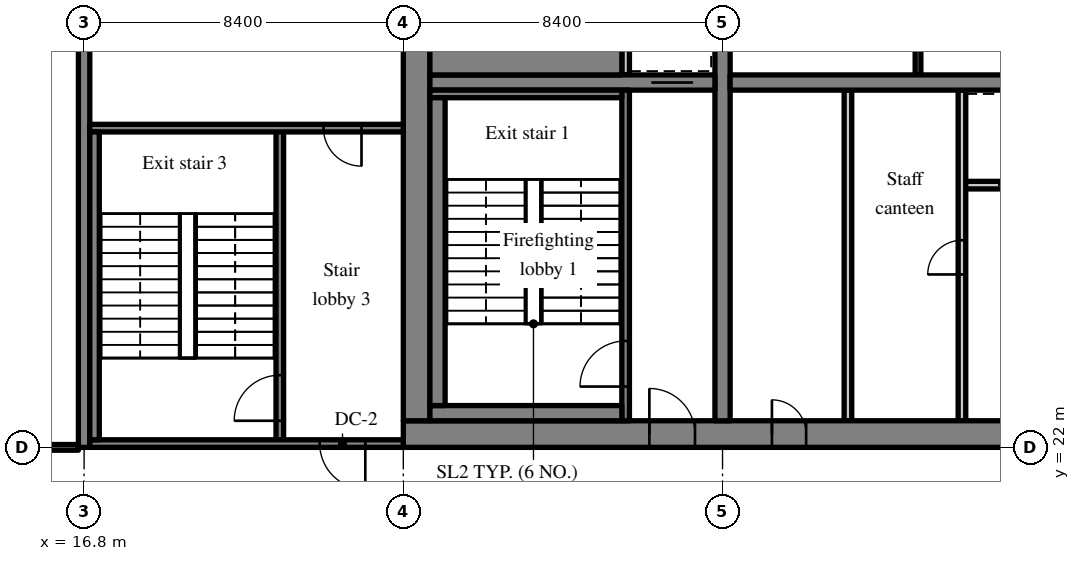
"""IFC4 building model, lengths in metres.
Left out: names, types, materials, properties, quantities, classifications, styles, units other than length and angle.
Written with IfcOpenShell. Run it as: python <this file> out.ifc"""

import sys

from ifc_helpers import new_model, si_unit, direction, frame, frame_2d, origin, place, context, subcontext, project, spatial, rectangle, extrude, source, transform, mapped, element, fill, save


model = new_model("IFC4")
c1 = context("Model", 3, precision=1e-05, world=origin(), true_north=direction((0.0, 1.0)))
c2 = subcontext(c1, "Body", "Model", "MODEL_VIEW")
j1 = project(units=[si_unit("LENGTHUNIT", "METRE"), si_unit("PLANEANGLEUNIT", "RADIAN")], contexts=[c1])
p1 = place(None, origin())
s1 = spatial("IfcSite", under=j1, at=p1, CompositionType="ELEMENT")
p2 = place(p1, origin())
s2 = spatial("IfcBuilding", under=s1, at=p2, CompositionType="ELEMENT")
p3 = place(p2, frame((0.0, 0.0, 163.0)))
s3 = spatial("IfcBuildingStorey", under=s2, at=p3, CompositionType="ELEMENT", Elevation=163.0)
m1 = source(origin(), c2, "Body", "SweptSolid", [
    extrude(rectangle(XDim=50.4, YDim=0.7, at=frame_2d((25.2, 0.0))), origin(), (0.0, 0.0, 1.0), 3.52),
])
p4 = place(p3, frame((25.2, 22.35, 0.0), z_axis=(0.0, 0.0, 1.0), x_axis=(1.0, 0.0, 0.0)))
e1 = element("IfcWall", 1, at=p4, inside=s3, PredefinedType="SHEAR", context=c2, shape_type="MappedRepresentation", body=[
    mapped(m1, transform((0.0, 0.0, 0.0), scale=1.0)),
])
m2 = source(origin(), c2, "Body", "SweptSolid", [
    extrude(rectangle(XDim=1.8, YDim=2.1, at=frame_2d((0.9, 1.05))), frame((0.0, 0.36, 0.0), z_axis=(0.0, -1.0, 0.0), x_axis=(1.0, 0.0, 0.0)), (0.0, 0.0, 1.0), 0.72),
])
p5 = place(p4, frame((15.9, 0.0, 0.0)))
e2 = element("IfcOpeningElement", 2, at=p5, cuts=e1, PredefinedType="OPENING", context=c2, shape_type="MappedRepresentation", body=[
    mapped(m2, transform((0.0, 0.0, 0.0), scale=1.0)),
])
m3 = source(origin(), c2, "Body", "SweptSolid", [
    extrude(rectangle(XDim=0.9, YDim=2.1, at=frame_2d((0.45, 1.05))), frame((0.0, 0.36, 0.0), z_axis=(0.0, -1.0, 0.0), x_axis=(1.0, 0.0, 0.0)), (0.0, 0.0, 1.0), 0.72),
])
p6 = place(p4, frame((9.7, 0.0, 0.0)))
e3 = element("IfcOpeningElement", 3, at=p6, cuts=e1, PredefinedType="OPENING", context=c2, shape_type="MappedRepresentation", body=[
    mapped(m3, transform((0.0, 0.0, 0.0), scale=1.0)),
])
p7 = place(p4, frame((21.5, 0.0, 0.0)))
e4 = element("IfcOpeningElement", 4, at=p7, cuts=e1, PredefinedType="OPENING", context=c2, shape_type="MappedRepresentation", body=[
    mapped(m3, transform((0.0, 0.0, 0.0), scale=1.0)),
])
p8 = place(p4, frame((32.7, 0.0, 0.0)))
e5 = element("IfcOpeningElement", 5, at=p8, cuts=e1, PredefinedType="OPENING", context=c2, shape_type="MappedRepresentation", body=[
    mapped(m2, transform((0.0, 0.0, 0.0), scale=1.0)),
])
m4 = source(origin(), c2, "Body", "SweptSolid", [
    extrude(rectangle(XDim=1.2, YDim=2.1, at=frame_2d((0.6, 1.05))), frame((0.0, 0.36, 0.0), z_axis=(0.0, -1.0, 0.0), x_axis=(1.0, 0.0, 0.0)), (0.0, 0.0, 1.0), 0.72),
])
p9 = place(p4, frame((6.475, 0.0, 0.0)))
e6 = element("IfcOpeningElement", 6, at=p9, cuts=e1, PredefinedType="OPENING", context=c2, shape_type="MappedRepresentation", body=[
    mapped(m4, transform((0.0, 0.0, 0.0), scale=1.0)),
])
p10 = place(p4, frame((47.875, 0.0, 0.0)))
e7 = element("IfcOpeningElement", 7, at=p10, cuts=e1, PredefinedType="OPENING", context=c2, shape_type="MappedRepresentation", body=[
    mapped(m4, transform((0.0, 0.0, 0.0), scale=1.0)),
])
m5 = source(origin(), c2, "Body", "SweptSolid", [
    extrude(rectangle(XDim=18.6, YDim=0.7, at=frame_2d((9.3, 0.0))), origin(), (0.0, 0.0, 1.0), 3.52),
])
p11 = place(p3, frame((25.55, 22.7, 0.0), z_axis=(0.0, 0.0, 1.0), x_axis=(0.0, 1.0, 0.0)))
e8 = element("IfcWall", 8, at=p11, inside=s3, PredefinedType="SHEAR", context=c2, shape_type="MappedRepresentation", body=[
    mapped(m5, transform((0.0, 0.0, 0.0), scale=1.0)),
])
m6 = source(origin(), c2, "Body", "SweptSolid", [
    extrude(rectangle(XDim=18.6, YDim=0.4, at=frame_2d((9.3, 0.0))), origin(), (0.0, 0.0, 1.0), 3.52),
])
p12 = place(p3, frame((33.6, 22.7, 0.0), z_axis=(0.0, 0.0, 1.0), x_axis=(0.0, 1.0, 0.0)))
e9 = element("IfcWall", 9, at=p12, inside=s3, PredefinedType="SHEAR", context=c2, shape_type="MappedRepresentation", body=[
    mapped(m6, transform((0.0, 0.0, 0.0), scale=1.0)),
])
m7 = source(origin(), c2, "Body", "SweptSolid", [
    extrude(rectangle(XDim=1.1, YDim=2.1, at=frame_2d((0.55, 1.05))), frame((0.0, 0.21, 0.0), z_axis=(0.0, -1.0, 0.0), x_axis=(1.0, 0.0, 0.0)), (0.0, 0.0, 1.0), 0.42),
])
p13 = place(p12, frame((12.75, 0.0, 0.0)))
e10 = element("IfcOpeningElement", 10, at=p13, cuts=e9, PredefinedType="OPENING", context=c2, shape_type="MappedRepresentation", body=[
    mapped(m7, transform((0.0, 0.0, 0.0), scale=1.0)),
])
m8 = source(origin(), c2, "Body", "SweptSolid", [
    extrude(rectangle(XDim=7.5, YDim=0.4, at=frame_2d((3.75, 0.0))), origin(), (0.0, 0.0, 1.0), 3.52),
])
p14 = place(p3, frame((25.9, 31.6, 0.0), z_axis=(0.0, 0.0, 1.0), x_axis=(1.0, 0.0, 0.0)))
e11 = element("IfcWall", 11, at=p14, inside=s3, PredefinedType="SHEAR", context=c2, shape_type="MappedRepresentation", body=[
    mapped(m8, transform((0.0, 0.0, 0.0), scale=1.0)),
])
p15 = place(p14, frame((5.825, 0.0, 0.0)))
e12 = element("IfcOpeningElement", 12, at=p15, cuts=e11, PredefinedType="OPENING", context=c2, shape_type="MappedRepresentation", body=[
    mapped(m7, transform((0.0, 0.0, 0.0), scale=1.0)),
])
m9 = source(origin(), c2, "Body", "SweptSolid", [
    extrude(rectangle(XDim=16.4, YDim=0.4, at=frame_2d((8.2, 0.0))), origin(), (0.0, 0.0, 1.0), 3.52),
])
p16 = place(p3, frame((33.8, 31.6, 0.0), z_axis=(0.0, 0.0, 1.0), x_axis=(1.0, 0.0, 0.0)))
e13 = element("IfcWall", 13, at=p16, inside=s3, PredefinedType="SHEAR", context=c2, shape_type="MappedRepresentation", body=[
    mapped(m9, transform((0.0, 0.0, 0.0), scale=1.0)),
])
m10 = source(origin(), c2, "Body", "SweptSolid", [
    extrude(rectangle(XDim=1.0, YDim=2.1, at=frame_2d((0.5, 1.05))), frame((0.0, 0.21, 0.0), z_axis=(0.0, -1.0, 0.0), x_axis=(1.0, 0.0, 0.0)), (0.0, 0.0, 1.0), 0.42),
])
p17 = place(p16, frame((14.8, 0.0, 0.0)))
e14 = element("IfcOpeningElement", 14, at=p17, cuts=e13, PredefinedType="OPENING", context=c2, shape_type="MappedRepresentation", body=[
    mapped(m10, transform((0.0, 0.0, 0.0), scale=1.0)),
])
m11 = source(origin(), c2, "Body", "SweptSolid", [
    extrude(rectangle(XDim=20.0, YDim=0.3, at=frame_2d((10.0, 0.0))), origin(), (0.0, 0.0, 1.0), 3.52),
])
p18 = place(p3, frame((16.8, 22.0, 0.0), z_axis=(0.0, 0.0, 1.0), x_axis=(0.0, 1.0, 0.0)))
e15 = element("IfcWall", 15, at=p18, inside=s3, PredefinedType="SHEAR", context=c2, shape_type="MappedRepresentation", body=[
    mapped(m11, transform((0.0, 0.0, 0.0), scale=1.0)),
])
m12 = source(origin(), c2, "Body", "SweptSolid", [
    extrude(rectangle(XDim=6.0, YDim=0.2, at=frame_2d((3.0, 0.0))), origin(), (0.0, 0.0, 1.0), 3.52),
])
p19 = place(p3, frame((39.9, 28.9, 0.0), z_axis=(0.0, 0.0, 1.0), x_axis=(1.0, 0.0, 0.0)))
e16 = element("IfcWall", 16, at=p19, inside=s3, PredefinedType="SOLIDWALL", context=c2, shape_type="MappedRepresentation", body=[
    mapped(m12, transform((0.0, 0.0, 0.0), scale=1.0)),
])
m13 = source(origin(), c2, "Body", "SweptSolid", [
    extrude(rectangle(XDim=1.1, YDim=2.1, at=frame_2d((0.55, 1.05))), frame((0.0, 0.11, 0.0), z_axis=(0.0, -1.0, 0.0), x_axis=(1.0, 0.0, 0.0)), (0.0, 0.0, 1.0), 0.22),
])
p20 = place(p19, frame((0.95, 0.0, 0.0)))
e17 = element("IfcOpeningElement", 17, at=p20, cuts=e16, PredefinedType="OPENING", context=c2, shape_type="MappedRepresentation", body=[
    mapped(m13, transform((0.0, 0.0, 0.0), scale=1.0)),
])
p21 = place(p19, frame((3.95, 0.0, 0.0)))
e18 = element("IfcOpeningElement", 18, at=p21, cuts=e16, PredefinedType="OPENING", context=c2, shape_type="MappedRepresentation", body=[
    mapped(m13, transform((0.0, 0.0, 0.0), scale=1.0)),
])
m14 = source(origin(), c2, "Body", "SweptSolid", [
    extrude(rectangle(XDim=8.7, YDim=0.2, at=frame_2d((4.35, 0.0))), origin(), (0.0, 0.0, 1.0), 3.52),
])
p22 = place(p3, frame((39.9, 22.7, 0.0), z_axis=(0.0, 0.0, 1.0), x_axis=(0.0, 1.0, 0.0)))
e19 = element("IfcWall", 19, at=p22, inside=s3, PredefinedType="PARTITIONING", context=c2, shape_type="MappedRepresentation", body=[
    mapped(m14, transform((0.0, 0.0, 0.0), scale=1.0)),
])
m15 = source(origin(), c2, "Body", "SweptSolid", [
    extrude(rectangle(XDim=0.9, YDim=2.1, at=frame_2d((0.45, 1.05))), frame((0.0, 0.11, 0.0), z_axis=(0.0, -1.0, 0.0), x_axis=(1.0, 0.0, 0.0)), (0.0, 0.0, 1.0), 0.22),
])
p23 = place(p22, frame((3.85, 0.0, 0.0)))
e20 = element("IfcOpeningElement", 20, at=p23, cuts=e19, PredefinedType="OPENING", context=c2, shape_type="MappedRepresentation", body=[
    mapped(m15, transform((0.0, 0.0, 0.0), scale=1.0)),
])
p24 = place(p3, frame((36.9, 22.7, 0.0), z_axis=(0.0, 0.0, 1.0), x_axis=(0.0, 1.0, 0.0)))
e21 = element("IfcWall", 21, at=p24, inside=s3, PredefinedType="PARTITIONING", context=c2, shape_type="MappedRepresentation", body=[
    mapped(m14, transform((0.0, 0.0, 0.0), scale=1.0)),
])
m16 = source(origin(), c2, "Body", "SweptSolid", [
    extrude(rectangle(XDim=3.2, YDim=0.15, at=frame_2d((1.6, 0.0))), origin(), (0.0, 0.0, 1.0), 3.52),
])
p25 = place(p3, frame((38.744, 31.8, 0.0), z_axis=(0.0, 0.0, 1.0), x_axis=(0.0, 1.0, 0.0)))
e22 = element("IfcWall", 22, at=p25, inside=s3, PredefinedType="PARTITIONING", context=c2, shape_type="MappedRepresentation", body=[
    mapped(m16, transform((0.0, 0.0, 0.0), scale=1.0)),
])
m17 = source(origin(), c2, "Body", "SweptSolid", [
    extrude(rectangle(XDim=8.7, YDim=0.2, at=frame_2d((4.35, 0.0))), origin(), (0.0, 0.0, 1.0), 3.52),
])
p26 = place(p3, frame((31.05, 22.7, 0.0), z_axis=(0.0, 0.0, 1.0), x_axis=(0.0, 1.0, 0.0)))
e23 = element("IfcWall", 23, at=p26, inside=s3, PredefinedType="SOLIDWALL", context=c2, shape_type="MappedRepresentation", body=[
    mapped(m17, transform((0.0, 0.0, 0.0), scale=1.0)),
])
m18 = source(origin(), c2, "Body", "SweptSolid", [
    extrude(rectangle(XDim=1.2, YDim=2.1, at=frame_2d((0.6, 1.05))), frame((0.0, 0.11, 0.0), z_axis=(0.0, -1.0, 0.0), x_axis=(1.0, 0.0, 0.0)), (0.0, 0.0, 1.0), 0.22),
])
p27 = place(p26, frame((0.9, 0.0, 0.0)))
e24 = element("IfcOpeningElement", 24, at=p27, cuts=e23, PredefinedType="OPENING", context=c2, shape_type="MappedRepresentation", body=[
    mapped(m18, transform((0.0, 0.0, 0.0), scale=1.0)),
])
m19 = source(origin(), c2, "Body", "SweptSolid", [
    extrude(rectangle(XDim=1.8, YDim=0.2, at=frame_2d((0.9, 0.0))), origin(), (0.0, 0.0, 1.0), 3.52),
])
p28 = place(p3, frame((31.05, 31.8, 0.0), z_axis=(0.0, 0.0, 1.0), x_axis=(0.0, 1.0, 0.0)))
e25 = element("IfcWall", 25, at=p28, inside=s3, PredefinedType="SOLIDWALL", context=c2, shape_type="MappedRepresentation", body=[
    mapped(m19, transform((0.0, 0.0, 0.0), scale=1.0)),
])
m20 = source(origin(), c2, "Body", "SweptSolid", [
    extrude(rectangle(XDim=8.3, YDim=0.2, at=frame_2d((4.15, 0.0))), origin(), (0.0, 0.0, 1.0), 3.52),
])
p29 = place(p3, frame((21.95, 22.1, 0.0), z_axis=(0.0, 0.0, 1.0), x_axis=(0.0, 1.0, 0.0)))
e26 = element("IfcWall", 26, at=p29, inside=s3, PredefinedType="SOLIDWALL", context=c2, shape_type="MappedRepresentation", body=[
    mapped(m20, transform((0.0, 0.0, 0.0), scale=1.0)),
])
p30 = place(p29, frame((0.6, 0.0, 0.0)))
e27 = element("IfcOpeningElement", 27, at=p30, cuts=e26, PredefinedType="OPENING", context=c2, shape_type="MappedRepresentation", body=[
    mapped(m18, transform((0.0, 0.0, 0.0), scale=1.0)),
])
m21 = source(origin(), c2, "Body", "SweptSolid", [
    extrude(rectangle(XDim=8.25, YDim=0.2, at=frame_2d((4.125, 0.0))), origin(), (0.0, 0.0, 1.0), 3.52),
])
p31 = place(p3, frame((16.95, 22.1, 0.0), z_axis=(0.0, 0.0, 1.0), x_axis=(1.0, 0.0, 0.0)))
e28 = element("IfcWall", 28, at=p31, inside=s3, PredefinedType="SOLIDWALL", context=c2, shape_type="MappedRepresentation", body=[
    mapped(m21, transform((0.0, 0.0, 0.0), scale=1.0)),
])
p32 = place(p31, frame((6.05, 0.0, 0.0)))
e29 = element("IfcOpeningElement", 29, at=p32, cuts=e28, PredefinedType="OPENING", context=c2, shape_type="MappedRepresentation", body=[
    mapped(m18, transform((0.0, 0.0, 0.0), scale=1.0)),
])
p33 = place(p3, frame((16.95, 30.4, 0.0), z_axis=(0.0, 0.0, 1.0), x_axis=(1.0, 0.0, 0.0)))
e30 = element("IfcWall", 30, at=p33, inside=s3, PredefinedType="SOLIDWALL", context=c2, shape_type="MappedRepresentation", body=[
    mapped(m21, transform((0.0, 0.0, 0.0), scale=1.0)),
])
m22 = source(origin(), c2, "Body", "SweptSolid", [
    extrude(rectangle(XDim=1.0, YDim=2.1, at=frame_2d((0.5, 1.05))), frame((0.0, 0.11, 0.0), z_axis=(0.0, -1.0, 0.0), x_axis=(1.0, 0.0, 0.0)), (0.0, 0.0, 1.0), 0.22),
])
p34 = place(p33, frame((6.15, 0.0, 0.0)))
e31 = element("IfcOpeningElement", 31, at=p34, cuts=e30, PredefinedType="OPENING", context=c2, shape_type="MappedRepresentation", body=[
    mapped(m22, transform((0.0, 0.0, 0.0), scale=1.0)),
])
m23 = source(origin(), c2, "Body", "SweptSolid", [
    extrude(rectangle(XDim=5.05, YDim=0.4, at=frame_2d((2.525, 0.0))), origin(), (0.0, 0.0, 1.0), 3.52),
])
p35 = place(p3, frame((25.9, 22.9, 0.0), z_axis=(0.0, 0.0, 1.0), x_axis=(1.0, 0.0, 0.0)))
e32 = element("IfcWall", 32, at=p35, inside=s3, PredefinedType="SOLIDWALL", context=c2, shape_type="MappedRepresentation", body=[
    mapped(m23, transform((0.0, 0.0, 0.0), scale=1.0)),
])
m24 = source(origin(), c2, "Body", "SweptSolid", [
    extrude(rectangle(XDim=5.05, YDim=0.2, at=frame_2d((2.525, 0.0))), origin(), (0.0, 0.0, 1.0), 3.52),
])
p36 = place(p3, frame((25.9, 31.3, 0.0), z_axis=(0.0, 0.0, 1.0), x_axis=(1.0, 0.0, 0.0)))
e33 = element("IfcWall", 33, at=p36, inside=s3, PredefinedType="SOLIDWALL", context=c2, shape_type="MappedRepresentation", body=[
    mapped(m24, transform((0.0, 0.0, 0.0), scale=1.0)),
])
m25 = source(origin(), c2, "Body", "SweptSolid", [
    extrude(rectangle(XDim=8.1, YDim=0.4, at=frame_2d((4.05, 0.0))), origin(), (0.0, 0.0, 1.0), 3.52),
])
p37 = place(p3, frame((26.1, 23.1, 0.0), z_axis=(0.0, 0.0, 1.0), x_axis=(0.0, 1.0, 0.0)))
e34 = element("IfcWall", 34, at=p37, inside=s3, PredefinedType="SOLIDWALL", context=c2, shape_type="MappedRepresentation", body=[
    mapped(m25, transform((0.0, 0.0, 0.0), scale=1.0)),
])
m26 = source(origin(), c2, "Body", "SweptSolid", [
    extrude(rectangle(XDim=8.1, YDim=0.25, at=frame_2d((4.05, 0.0))), origin(), (0.0, 0.0, 1.0), 3.52),
])
p38 = place(p3, frame((17.075, 22.2, 0.0), z_axis=(0.0, 0.0, 1.0), x_axis=(0.0, 1.0, 0.0)))
e35 = element("IfcWall", 35, at=p38, inside=s3, PredefinedType="SOLIDWALL", context=c2, shape_type="MappedRepresentation", body=[
    mapped(m26, transform((0.0, 0.0, 0.0), scale=1.0)),
])
m27 = source(origin(), c2, "Body", "SweptSolid", [
    extrude(rectangle(XDim=5.05, YDim=1.0, at=frame_2d((2.525, 0.0))), origin(), (0.0, 0.0, 1.0), 3.52),
])
p39 = place(p3, frame((25.9, 32.3, 0.0), z_axis=(0.0, 0.0, 1.0), x_axis=(1.0, 0.0, 0.0)))
e36 = element("IfcWall", 36, at=p39, inside=s3, PredefinedType="SOLIDWALL", context=c2, shape_type="MappedRepresentation", body=[
    mapped(m27, transform((0.0, 0.0, 0.0), scale=1.0)),
])
m28 = source(origin(), c2, "Body", "SweptSolid", [
    extrude(rectangle(XDim=7.95, YDim=0.15, at=frame_2d((3.975, 0.0))), origin(), (0.0, 0.0, 1.0), 2.82),
])
p40 = place(p3, frame((8.7, 22.0, 0.0), z_axis=(0.0, 0.0, 1.0), x_axis=(1.0, 0.0, 0.0)))
e37 = element("IfcWall", 37, at=p40, inside=s3, PredefinedType="PARTITIONING", context=c2, shape_type="MappedRepresentation", body=[
    mapped(m28, transform((0.0, 0.0, 0.0), scale=1.0)),
])
m29 = source(origin(), c2, "Body", "SweptSolid", [
    extrude(rectangle(XDim=1.8, YDim=2.1, at=frame_2d((0.9, 1.05))), frame((0.0, 0.085, 0.0), z_axis=(0.0, -1.0, 0.0), x_axis=(1.0, 0.0, 0.0)), (0.0, 0.0, 1.0), 0.17),
])
p41 = place(p40, frame((3.075, 0.0, 0.0)))
e38 = element("IfcOpeningElement", 38, at=p41, cuts=e37, PredefinedType="OPENING", context=c2, shape_type="MappedRepresentation", body=[
    mapped(m29, transform((0.0, 0.0, 0.0), scale=1.0)),
])
m30 = source(origin(), c2, "Body", "SweptSolid", [
    extrude(rectangle(XDim=1.1, YDim=2.1, at=frame_2d((0.55, 1.05))), frame((0.0, 0.025, 0.0), z_axis=(0.0, -1.0, 0.0), x_axis=(1.0, 0.0, 0.0)), (0.0, 0.0, 1.0), 0.05),
])
p42 = place(p20, origin())
e39 = element("IfcDoor", 39, at=p42, inside=s3, OperationType="SLIDING_TO_LEFT", PredefinedType="DOOR", context=c2, shape_type="MappedRepresentation", body=[
    mapped(m30, transform((0.0, 0.0, 0.0), scale=1.0)),
])
fill(e17, e39)
m31 = source(origin(), c2, "Body", "SweptSolid", [
    extrude(rectangle(XDim=0.9, YDim=2.1, at=frame_2d((0.45, 1.05))), frame((0.0, 0.275, 0.0), z_axis=(0.0, -1.0, 0.0), x_axis=(1.0, 0.0, 0.0)), (0.0, 0.0, 1.0), 0.05),
])
p43 = place(p6, origin())
e40 = element("IfcDoor", 40, at=p43, inside=s3, OperationType="SINGLE_SWING_LEFT", PredefinedType="DOOR", context=c2, shape_type="MappedRepresentation", body=[
    mapped(m31, transform((0.0, 0.0, 0.0), scale=1.0)),
])
fill(e3, e40)
m32 = source(origin(), c2, "Body", "SweptSolid", [
    extrude(rectangle(XDim=0.9, YDim=2.1, at=frame_2d((0.45, 1.05))), frame((0.0, 0.025, 0.0), z_axis=(0.0, -1.0, 0.0), x_axis=(1.0, 0.0, 0.0)), (0.0, 0.0, 1.0), 0.05),
])
p44 = place(p23, origin())
e41 = element("IfcDoor", 41, at=p44, inside=s3, OperationType="SINGLE_SWING_LEFT", PredefinedType="DOOR", context=c2, shape_type="MappedRepresentation", body=[
    mapped(m32, transform((0.0, 0.0, 0.0), scale=1.0)),
])
fill(e20, e41)
m33 = source(origin(), c2, "Body", "SweptSolid", [
    extrude(rectangle(XDim=1.2, YDim=2.1, at=frame_2d((0.6, 1.05))), frame((0.0, 0.025, 0.0), z_axis=(0.0, -1.0, 0.0), x_axis=(1.0, 0.0, 0.0)), (0.0, 0.0, 1.0), 0.05),
])
p45 = place(p27, origin())
e42 = element("IfcDoor", 42, at=p45, inside=s3, OperationType="SINGLE_SWING_LEFT", PredefinedType="DOOR", context=c2, shape_type="MappedRepresentation", body=[
    mapped(m33, transform((0.0, 0.0, 0.0), scale=1.0)),
])
fill(e24, e42)
m34 = source(origin(), c2, "Body", "SweptSolid", [
    extrude(rectangle(XDim=1.2, YDim=2.1, at=frame_2d((0.6, 1.05))), frame((0.0, 0.275, 0.0), z_axis=(0.0, -1.0, 0.0), x_axis=(1.0, 0.0, 0.0)), (0.0, 0.0, 1.0), 0.05),
])
p46 = place(p9, origin())
e43 = element("IfcDoor", 43, at=p46, inside=s3, OperationType="SINGLE_SWING_LEFT", PredefinedType="DOOR", context=c2, shape_type="MappedRepresentation", body=[
    mapped(m34, transform((0.0, 0.0, 0.0), scale=1.0)),
])
fill(e6, e43)
p47 = place(p15, origin())
e44 = element("IfcDoor", 44, at=p47, inside=s3, OperationType="SLIDING_TO_LEFT", PredefinedType="DOOR", context=c2, shape_type="MappedRepresentation", body=[
    mapped(m30, transform((0.0, 0.0, 0.0), scale=1.0)),
])
fill(e12, e44)
p48 = place(p30, origin())
e45 = element("IfcDoor", 45, at=p48, inside=s3, OperationType="SINGLE_SWING_LEFT", PredefinedType="DOOR", context=c2, shape_type="MappedRepresentation", body=[
    mapped(m33, transform((0.0, 0.0, 0.0), scale=1.0)),
])
fill(e27, e45)
p49 = place(p32, origin())
e46 = element("IfcDoor", 46, at=p49, inside=s3, OperationType="SINGLE_SWING_RIGHT", PredefinedType="DOOR", context=c2, shape_type="MappedRepresentation", body=[
    mapped(m33, transform((0.0, 0.0, 0.0), scale=1.0)),
])
fill(e29, e46)
m35 = source(origin(), c2, "Body", "SweptSolid", [
    extrude(rectangle(XDim=1.0, YDim=2.1, at=frame_2d((0.5, 1.05))), frame((0.0, 0.025, 0.0), z_axis=(0.0, -1.0, 0.0), x_axis=(1.0, 0.0, 0.0)), (0.0, 0.0, 1.0), 0.05),
])
p50 = place(p34, origin())
e47 = element("IfcDoor", 47, at=p50, inside=s3, OperationType="SINGLE_SWING_RIGHT", PredefinedType="DOOR", context=c2, shape_type="MappedRepresentation", body=[
    mapped(m35, transform((0.0, 0.0, 0.0), scale=1.0)),
])
fill(e31, e47)
save(model, sys.argv[1])
